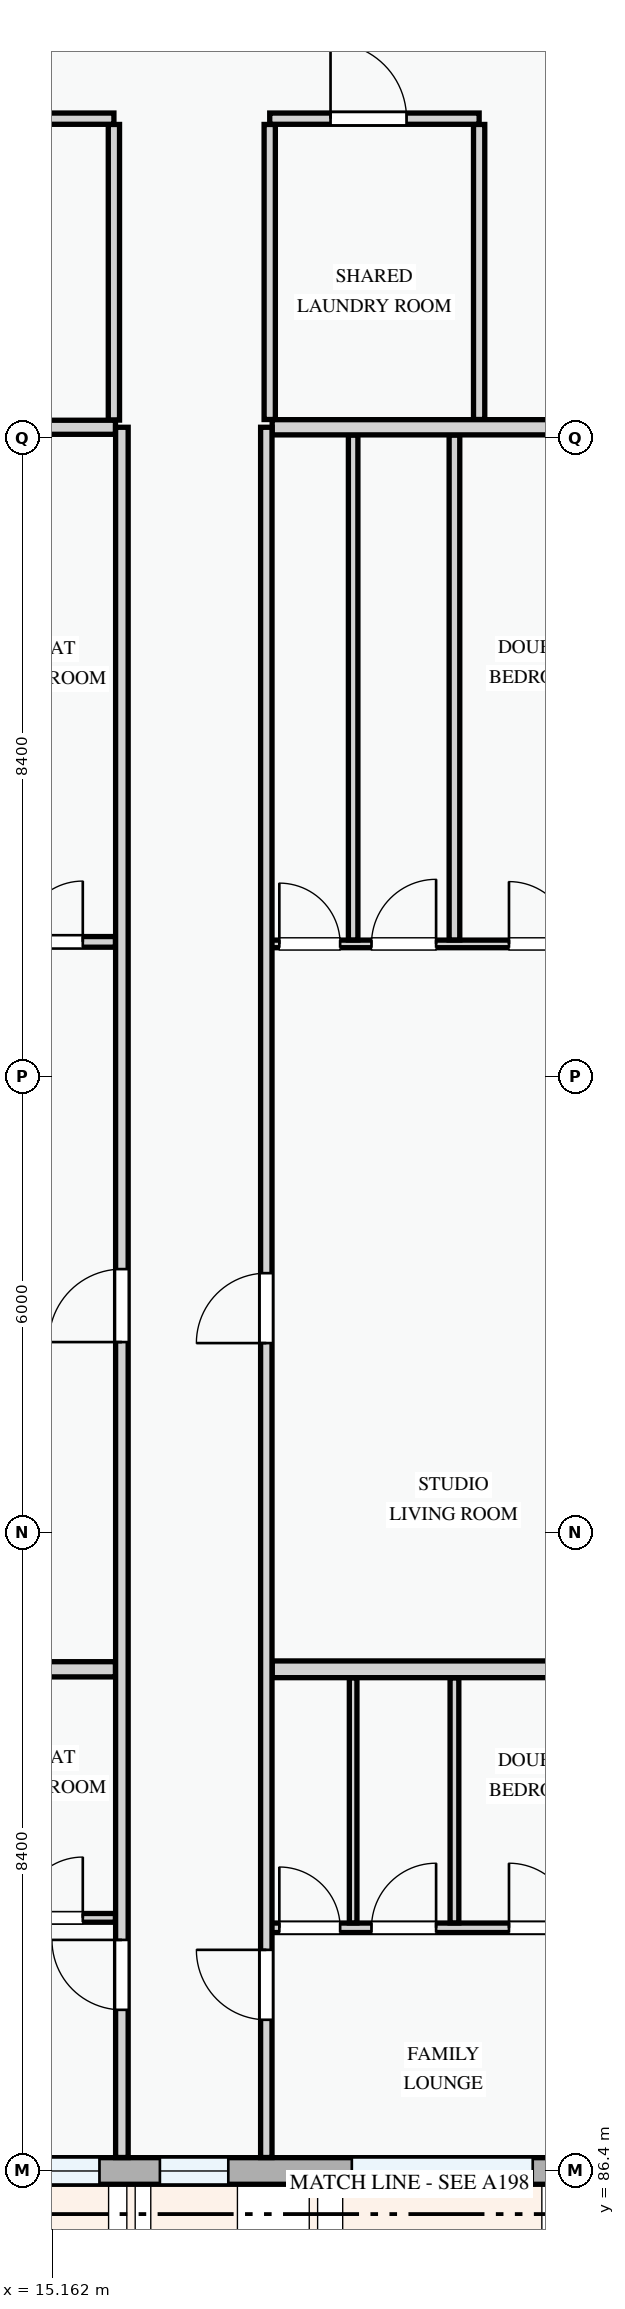
"""IFC4 building model, lengths in metres.
Left out: names, types, materials, properties, quantities, classifications, styles, units other than length and angle.
Written with IfcOpenShell. Run it as: python <this file> out.ifc"""

import sys

from ifc_helpers import new_model, si_unit, direction, frame, frame_2d, origin, place, context, subcontext, project, spatial, rectangle, extrude, element, fill, save


model = new_model("IFC4")
c1 = context("Model", 3, precision=1e-05, world=origin(), true_north=direction((0.0, 1.0)))
c2 = subcontext(c1, "Body", "Model", "MODEL_VIEW")
j1 = project(units=[si_unit("LENGTHUNIT", "METRE"), si_unit("PLANEANGLEUNIT", "RADIAN")], contexts=[c1])
p1 = place(None, origin())
s1 = spatial("IfcSite", under=j1, at=p1, CompositionType="ELEMENT")
p2 = place(p1, origin())
s2 = spatial("IfcBuilding", under=s1, at=p2, CompositionType="ELEMENT")
p3 = place(p2, frame((0.0, 0.0, 47.7)))
s3 = spatial("IfcBuildingStorey", under=s2, at=p3, CompositionType="ELEMENT", Elevation=47.7)
p4 = place(p3, frame((14.4, 86.4, 0.0), z_axis=(0.0, 0.0, 1.0), x_axis=(1.0, 0.0, 0.0)))
e1 = element("IfcWall", 1, at=p4, inside=s3, PredefinedType="STANDARD", context=c2, shape_type="SweptSolid", body=[
    extrude(rectangle(XDim=8.4, YDim=0.35, at=frame_2d((4.2, 0.0))), origin(), (0.0, 0.0, 1.0), 2.375),
])
p5 = place(p4, frame((0.485, 0.0, 0.78)))
e2 = element("IfcOpeningElement", 2, at=p5, cuts=e1, PredefinedType="OPENING", context=c2, shape_type="SweptSolid", body=[
    extrude(rectangle(XDim=0.9, YDim=1.2, at=frame_2d((0.45, 0.6))), frame((0.0, 0.185, 0.0), z_axis=(0.0, -1.0, 0.0), x_axis=(1.0, 0.0, 0.0)), (0.0, 0.0, 1.0), 0.37),
])
p6 = place(p4, frame((2.18, 0.0, 0.78)))
e3 = element("IfcOpeningElement", 3, at=p6, cuts=e1, PredefinedType="OPENING", context=c2, shape_type="SweptSolid", body=[
    extrude(rectangle(XDim=0.9, YDim=1.2, at=frame_2d((0.45, 0.6))), frame((0.0, 0.185, 0.0), z_axis=(0.0, -1.0, 0.0), x_axis=(1.0, 0.0, 0.0)), (0.0, 0.0, 1.0), 0.37),
])
p7 = place(p4, frame((4.705, 0.0, 0.78)))
e4 = element("IfcOpeningElement", 4, at=p7, cuts=e1, PredefinedType="OPENING", context=c2, shape_type="SweptSolid", body=[
    extrude(rectangle(XDim=2.38, YDim=1.48, at=frame_2d((1.19, 0.74))), frame((0.0, 0.185, 0.0), z_axis=(0.0, -1.0, 0.0), x_axis=(1.0, 0.0, 0.0)), (0.0, 0.0, 1.0), 0.37),
])
p8 = place(p3, frame((15.975, 113.324, 0.0), z_axis=(0.0, 0.0, 1.0), x_axis=(0.0, -1.0, 0.0)))
e5 = element("IfcWall", 5, at=p8, inside=s3, PredefinedType="PARTITIONING", context=c2, shape_type="SweptSolid", body=[
    extrude(rectangle(XDim=3.889, YDim=0.148, at=frame_2d((1.945, 0.0))), origin(), (0.0, 0.0, 1.0), 3.0),
])
for number, where, z_axis, x_axis in (
    (6, (18.025, 113.324, 0.0), (0.0, 0.0, 1.0), (0.0, -1.0, 0.0)),
    (7, (20.78, 113.324, 0.0), (0.0, 0.0, 1.0), (0.0, -1.0, 0.0)),
):
    element("IfcWall", number, at=place(p3, frame(where, z_axis=z_axis, x_axis=x_axis)), inside=s3, PredefinedType="PARTITIONING", context=c2, shape_type="SweptSolid", body=[
        extrude(rectangle(XDim=3.882, YDim=0.148, at=frame_2d((1.941, 0.0))), origin(), (0.0, 0.0, 1.0), 3.0),
    ])
p9 = place(p3, frame((8.577, 113.4, 0.0), z_axis=(0.0, 0.0, 1.0), x_axis=(1.0, 0.0, 0.0)))
e8 = element("IfcWall", 8, at=p9, inside=s3, PredefinedType="PARTITIONING", context=c2, shape_type="SweptSolid", body=[
    extrude(rectangle(XDim=7.398, YDim=0.148, at=frame_2d((3.699, 0.0))), origin(), (0.0, 0.0, 1.0), 3.0),
])
p10 = place(p9, frame((0.613, 0.0, 0.0)))
e9 = element("IfcOpeningElement", 9, at=p10, cuts=e8, PredefinedType="OPENING", context=c2, shape_type="SweptSolid", body=[
    extrude(rectangle(XDim=0.9, YDim=2.1, at=frame_2d((0.45, 1.05))), frame((0.0, 0.084, 0.0), z_axis=(0.0, -1.0, 0.0), x_axis=(1.0, 0.0, 0.0)), (0.0, 0.0, 1.0), 0.168),
])
p11 = place(p9, frame((4.163, 0.0, 0.0)))
e10 = element("IfcOpeningElement", 10, at=p11, cuts=e8, PredefinedType="OPENING", context=c2, shape_type="SweptSolid", body=[
    extrude(rectangle(XDim=0.95, YDim=2.1, at=frame_2d((0.475, 1.05))), frame((0.0, 0.084, 0.0), z_axis=(0.0, -1.0, 0.0), x_axis=(1.0, 0.0, 0.0)), (0.0, 0.0, 1.0), 0.168),
])
p12 = place(p3, frame((18.025, 113.4, 0.0), z_axis=(0.0, 0.0, 1.0), x_axis=(1.0, 0.0, 0.0)))
e11 = element("IfcWall", 11, at=p12, inside=s3, PredefinedType="PARTITIONING", context=c2, shape_type="SweptSolid", body=[
    extrude(rectangle(XDim=2.755, YDim=0.148, at=frame_2d((1.377, 0.0))), origin(), (0.0, 0.0, 1.0), 3.0),
])
p13 = place(p12, frame((0.8, 0.0, 0.0)))
e12 = element("IfcOpeningElement", 12, at=p13, cuts=e11, PredefinedType="OPENING", context=c2, shape_type="SweptSolid", body=[
    extrude(rectangle(XDim=1.0, YDim=2.15, at=frame_2d((0.5, 1.075))), frame((0.0, 0.084, 0.0), z_axis=(0.0, -1.0, 0.0), x_axis=(1.0, 0.0, 0.0)), (0.0, 0.0, 1.0), 0.168),
])
p14 = place(p3, frame((8.577, 89.73, 0.0), z_axis=(0.0, 0.0, 1.0), x_axis=(1.0, 0.0, 0.0)))
e13 = element("IfcWall", 13, at=p14, inside=s3, PredefinedType="PARTITIONING", context=c2, shape_type="SweptSolid", body=[
    extrude(rectangle(XDim=7.419, YDim=0.115, at=frame_2d((3.709, 0.0))), origin(), (0.0, 0.0, 1.0), 3.0),
])
p15 = place(p14, frame((1.287, 0.0, 0.0)))
e14 = element("IfcOpeningElement", 14, at=p15, cuts=e13, PredefinedType="OPENING", context=c2, shape_type="SweptSolid", body=[
    extrude(rectangle(XDim=0.85, YDim=2.1, at=frame_2d((0.425, 1.05))), frame((0.0, 0.067, 0.0), z_axis=(0.0, -1.0, 0.0), x_axis=(1.0, 0.0, 0.0)), (0.0, 0.0, 1.0), 0.135),
])
p16 = place(p14, frame((4.182, 0.0, 0.0)))
e15 = element("IfcOpeningElement", 15, at=p16, cuts=e13, PredefinedType="OPENING", context=c2, shape_type="SweptSolid", body=[
    extrude(rectangle(XDim=0.85, YDim=2.1, at=frame_2d((0.425, 1.05))), frame((0.0, 0.067, 0.0), z_axis=(0.0, -1.0, 0.0), x_axis=(1.0, 0.0, 0.0)), (0.0, 0.0, 1.0), 0.135),
])
p17 = place(p14, frame((6.189, 0.0, 0.0)))
e16 = element("IfcOpeningElement", 16, at=p17, cuts=e13, PredefinedType="OPENING", context=c2, shape_type="SweptSolid", body=[
    extrude(rectangle(XDim=0.8, YDim=2.1, at=frame_2d((0.4, 1.05))), frame((0.0, 0.067, 0.0), z_axis=(0.0, -1.0, 0.0), x_axis=(1.0, 0.0, 0.0)), (0.0, 0.0, 1.0), 0.135),
])
p18 = place(p3, frame((17.98, 89.599, 0.0), z_axis=(0.0, 0.0, 1.0), x_axis=(1.0, 0.0, 0.0)))
e17 = element("IfcWall", 17, at=p18, inside=s3, PredefinedType="PARTITIONING", context=c2, shape_type="SweptSolid", body=[
    extrude(rectangle(XDim=4.643, YDim=0.125, at=frame_2d((2.322, 0.0))), origin(), (0.0, 0.0, 1.0), 3.0),
])
p19 = place(p18, frame((0.171, 0.0, 0.0)))
e18 = element("IfcOpeningElement", 18, at=p19, cuts=e17, PredefinedType="OPENING", context=c2, shape_type="SweptSolid", body=[
    extrude(rectangle(XDim=0.8, YDim=2.1, at=frame_2d((0.4, 1.05))), frame((0.0, 0.073, 0.0), z_axis=(0.0, -1.0, 0.0), x_axis=(1.0, 0.0, 0.0)), (0.0, 0.0, 1.0), 0.145),
])
p20 = place(p18, frame((1.384, 0.0, 0.0)))
e19 = element("IfcOpeningElement", 19, at=p20, cuts=e17, PredefinedType="OPENING", context=c2, shape_type="SweptSolid", body=[
    extrude(rectangle(XDim=0.85, YDim=2.1, at=frame_2d((0.425, 1.05))), frame((0.0, 0.073, 0.0), z_axis=(0.0, -1.0, 0.0), x_axis=(1.0, 0.0, 0.0)), (0.0, 0.0, 1.0), 0.145),
])
p21 = place(p18, frame((3.193, 0.0, 0.0)))
e20 = element("IfcOpeningElement", 20, at=p21, cuts=e17, PredefinedType="OPENING", context=c2, shape_type="SweptSolid", body=[
    extrude(rectangle(XDim=0.85, YDim=2.1, at=frame_2d((0.425, 1.05))), frame((0.0, 0.073, 0.0), z_axis=(0.0, -1.0, 0.0), x_axis=(1.0, 0.0, 0.0)), (0.0, 0.0, 1.0), 0.145),
])
p22 = place(p3, frame((20.455, 89.664, 0.0), z_axis=(0.0, 0.0, 1.0), x_axis=(0.0, 1.0, 0.0)))
e21 = element("IfcWall", 21, at=p22, inside=s3, PredefinedType="PARTITIONING", context=c2, shape_type="SweptSolid", body=[
    extrude(rectangle(XDim=3.224, YDim=0.115, at=frame_2d((1.612, 0.0))), origin(), (0.0, 0.0, 1.0), 3.0),
])
p23 = place(p3, frame((19.122, 89.664, 0.0), z_axis=(0.0, 0.0, 1.0), x_axis=(0.0, 1.0, 0.0)))
e22 = element("IfcWall", 22, at=p23, inside=s3, PredefinedType="PARTITIONING", context=c2, shape_type="SweptSolid", body=[
    extrude(rectangle(XDim=3.224, YDim=0.1, at=frame_2d((1.612, 0.0))), origin(), (0.0, 0.0, 1.0), 3.0),
])
p24 = place(p3, frame((8.577, 102.57, 0.0), z_axis=(0.0, 0.0, 1.0), x_axis=(1.0, 0.0, 0.0)))
e23 = element("IfcWall", 23, at=p24, inside=s3, PredefinedType="PARTITIONING", context=c2, shape_type="SweptSolid", body=[
    extrude(rectangle(XDim=7.419, YDim=0.14, at=frame_2d((3.709, 0.0))), origin(), (0.0, 0.0, 1.0), 3.0),
])
p25 = place(p24, frame((1.287, 0.0, 0.0)))
e24 = element("IfcOpeningElement", 24, at=p25, cuts=e23, PredefinedType="OPENING", context=c2, shape_type="SweptSolid", body=[
    extrude(rectangle(XDim=0.85, YDim=2.1, at=frame_2d((0.425, 1.05))), frame((0.0, 0.08, 0.0), z_axis=(0.0, -1.0, 0.0), x_axis=(1.0, 0.0, 0.0)), (0.0, 0.0, 1.0), 0.16),
])
p26 = place(p24, frame((4.182, 0.0, 0.0)))
e25 = element("IfcOpeningElement", 25, at=p26, cuts=e23, PredefinedType="OPENING", context=c2, shape_type="SweptSolid", body=[
    extrude(rectangle(XDim=0.82, YDim=2.08, at=frame_2d((0.41, 1.04))), frame((0.0, 0.08, 0.0), z_axis=(0.0, -1.0, 0.0), x_axis=(1.0, 0.0, 0.0)), (0.0, 0.0, 1.0), 0.16),
])
p27 = place(p24, frame((6.189, 0.0, 0.0)))
e26 = element("IfcOpeningElement", 26, at=p27, cuts=e23, PredefinedType="OPENING", context=c2, shape_type="SweptSolid", body=[
    extrude(rectangle(XDim=0.8, YDim=2.1, at=frame_2d((0.4, 1.05))), frame((0.0, 0.08, 0.0), z_axis=(0.0, -1.0, 0.0), x_axis=(1.0, 0.0, 0.0)), (0.0, 0.0, 1.0), 0.16),
])
p28 = place(p3, frame((17.98, 102.543, 0.0), z_axis=(0.0, 0.0, 1.0), x_axis=(1.0, 0.0, 0.0)))
e27 = element("IfcWall", 27, at=p28, inside=s3, PredefinedType="PARTITIONING", context=c2, shape_type="SweptSolid", body=[
    extrude(rectangle(XDim=4.643, YDim=0.1, at=frame_2d((2.322, 0.0))), origin(), (0.0, 0.0, 1.0), 3.0),
])
p29 = place(p28, frame((0.171, 0.0, 0.0)))
e28 = element("IfcOpeningElement", 28, at=p29, cuts=e27, PredefinedType="OPENING", context=c2, shape_type="SweptSolid", body=[
    extrude(rectangle(XDim=0.8, YDim=2.1, at=frame_2d((0.4, 1.05))), frame((0.0, 0.06, 0.0), z_axis=(0.0, -1.0, 0.0), x_axis=(1.0, 0.0, 0.0)), (0.0, 0.0, 1.0), 0.12),
])
p30 = place(p28, frame((1.384, 0.0, 0.0)))
e29 = element("IfcOpeningElement", 29, at=p30, cuts=e27, PredefinedType="OPENING", context=c2, shape_type="SweptSolid", body=[
    extrude(rectangle(XDim=0.85, YDim=2.1, at=frame_2d((0.425, 1.05))), frame((0.0, 0.06, 0.0), z_axis=(0.0, -1.0, 0.0), x_axis=(1.0, 0.0, 0.0)), (0.0, 0.0, 1.0), 0.12),
])
p31 = place(p28, frame((3.193, 0.0, 0.0)))
e30 = element("IfcOpeningElement", 30, at=p31, cuts=e27, PredefinedType="OPENING", context=c2, shape_type="SweptSolid", body=[
    extrude(rectangle(XDim=0.82, YDim=2.08, at=frame_2d((0.41, 1.04))), frame((0.0, 0.06, 0.0), z_axis=(0.0, -1.0, 0.0), x_axis=(1.0, 0.0, 0.0)), (0.0, 0.0, 1.0), 0.12),
])
p32 = place(p3, frame((20.455, 102.595, 0.0), z_axis=(0.0, 0.0, 1.0), x_axis=(0.0, 1.0, 0.0)))
e31 = element("IfcWall", 31, at=p32, inside=s3, PredefinedType="PARTITIONING", context=c2, shape_type="SweptSolid", body=[
    extrude(rectangle(XDim=6.643, YDim=0.14, at=frame_2d((3.321, 0.0))), origin(), (0.0, 0.0, 1.0), 3.0),
])
p33 = place(p3, frame((19.122, 102.595, 0.0), z_axis=(0.0, 0.0, 1.0), x_axis=(0.0, 1.0, 0.0)))
e32 = element("IfcWall", 32, at=p33, inside=s3, PredefinedType="PARTITIONING", context=c2, shape_type="SweptSolid", body=[
    extrude(rectangle(XDim=6.643, YDim=0.125, at=frame_2d((3.321, 0.0))), origin(), (0.0, 0.0, 1.0), 3.0),
])
p34 = place(p3, frame((8.577, 93.0, 0.0), z_axis=(0.0, 0.0, 1.0), x_axis=(1.0, 0.0, 0.0)))
e33 = element("IfcWall", 33, at=p34, inside=s3, PredefinedType="PARTITIONING", context=c2, shape_type="SweptSolid", body=[
    extrude(rectangle(XDim=7.419, YDim=0.2, at=frame_2d((3.709, 0.0))), origin(), (0.0, 0.0, 1.0), 3.0),
])
p35 = place(p3, frame((18.057, 93.0, 0.0), z_axis=(0.0, 0.0, 1.0), x_axis=(1.0, 0.0, 0.0)))
e34 = element("IfcWall", 34, at=p35, inside=s3, PredefinedType="PARTITIONING", context=c2, shape_type="SweptSolid", body=[
    extrude(rectangle(XDim=4.566, YDim=0.22, at=frame_2d((2.283, 0.0))), origin(), (0.0, 0.0, 1.0), 3.0),
])
p36 = place(p3, frame((8.577, 109.34, 0.0), z_axis=(0.0, 0.0, 1.0), x_axis=(1.0, 0.0, 0.0)))
e35 = element("IfcWall", 35, at=p36, inside=s3, PredefinedType="PARTITIONING", context=c2, shape_type="SweptSolid", body=[
    extrude(rectangle(XDim=7.419, YDim=0.185, at=frame_2d((3.709, 0.0))), origin(), (0.0, 0.0, 1.0), 2.375),
])
p37 = place(p3, frame((18.057, 109.34, 0.0), z_axis=(0.0, 0.0, 1.0), x_axis=(1.0, 0.0, 0.0)))
e36 = element("IfcWall", 36, at=p37, inside=s3, PredefinedType="PARTITIONING", context=c2, shape_type="SweptSolid", body=[
    extrude(rectangle(XDim=4.683, YDim=0.2, at=frame_2d((2.342, 0.0))), origin(), (0.0, 0.0, 1.0), 2.375),
])
p38 = place(p3, frame((16.08, 86.577, 0.0), z_axis=(0.0, 0.0, 1.0), x_axis=(0.0, 1.0, 0.0)))
e37 = element("IfcWall", 37, at=p38, inside=s3, PredefinedType="PARTITIONING", context=c2, shape_type="SweptSolid", body=[
    extrude(rectangle(XDim=22.763, YDim=0.165, at=frame_2d((11.382, 0.0))), origin(), (0.0, 0.0, 1.0), 3.0),
])
p39 = place(p38, frame((1.943, 0.0, 0.0)))
e38 = element("IfcOpeningElement", 38, at=p39, cuts=e37, PredefinedType="OPENING", context=c2, shape_type="SweptSolid", body=[
    extrude(rectangle(XDim=0.92, YDim=2.1, at=frame_2d((0.46, 1.05))), frame((0.0, 0.093, 0.0), z_axis=(0.0, -1.0, 0.0), x_axis=(1.0, 0.0, 0.0)), (0.0, 0.0, 1.0), 0.185),
])
p40 = place(p38, frame((10.728, 0.0, 0.0)))
e39 = element("IfcOpeningElement", 39, at=p40, cuts=e37, PredefinedType="OPENING", context=c2, shape_type="SweptSolid", body=[
    extrude(rectangle(XDim=0.96, YDim=2.12, at=frame_2d((0.48, 1.06))), frame((0.0, 0.093, 0.0), z_axis=(0.0, -1.0, 0.0), x_axis=(1.0, 0.0, 0.0)), (0.0, 0.0, 1.0), 0.185),
])
p41 = place(p3, frame((17.98, 86.577, 0.0), z_axis=(0.0, 0.0, 1.0), x_axis=(0.0, 1.0, 0.0)))
e40 = element("IfcWall", 40, at=p41, inside=s3, PredefinedType="PARTITIONING", context=c2, shape_type="SweptSolid", body=[
    extrude(rectangle(XDim=22.763, YDim=0.15, at=frame_2d((11.382, 0.0))), origin(), (0.0, 0.0, 1.0), 3.0),
])
p42 = place(p41, frame((1.812, 0.0, 0.0)))
e41 = element("IfcOpeningElement", 41, at=p42, cuts=e40, PredefinedType="OPENING", context=c2, shape_type="SweptSolid", body=[
    extrude(rectangle(XDim=0.92, YDim=2.1, at=frame_2d((0.46, 1.05))), frame((0.0, 0.085, 0.0), z_axis=(0.0, -1.0, 0.0), x_axis=(1.0, 0.0, 0.0)), (0.0, 0.0, 1.0), 0.17),
])
p43 = place(p41, frame((10.715, 0.0, 0.0)))
e42 = element("IfcOpeningElement", 42, at=p43, cuts=e40, PredefinedType="OPENING", context=c2, shape_type="SweptSolid", body=[
    extrude(rectangle(XDim=0.92, YDim=2.1, at=frame_2d((0.46, 1.05))), frame((0.0, 0.085, 0.0), z_axis=(0.0, -1.0, 0.0), x_axis=(1.0, 0.0, 0.0)), (0.0, 0.0, 1.0), 0.17),
])
p44 = place(p5, origin())
e43 = element("IfcWindow", 43, at=p44, inside=s3, PartitioningType="SINGLE_PANEL", PredefinedType="WINDOW", context=c2, shape_type="SweptSolid", body=[
    extrude(rectangle(XDim=0.9, YDim=1.2, at=frame_2d((0.45, 0.6))), frame((0.0, 0.03, 0.0), z_axis=(0.0, -1.0, 0.0), x_axis=(1.0, 0.0, 0.0)), (0.0, 0.0, 1.0), 0.06),
])
fill(e2, e43)
p45 = place(p6, origin())
e44 = element("IfcWindow", 44, at=p45, inside=s3, PartitioningType="SINGLE_PANEL", PredefinedType="WINDOW", context=c2, shape_type="SweptSolid", body=[
    extrude(rectangle(XDim=0.9, YDim=1.2, at=frame_2d((0.45, 0.6))), frame((0.0, 0.03, 0.0), z_axis=(0.0, -1.0, 0.0), x_axis=(1.0, 0.0, 0.0)), (0.0, 0.0, 1.0), 0.06),
])
fill(e3, e44)
p46 = place(p7, origin())
e45 = element("IfcWindow", 45, at=p46, inside=s3, PartitioningType="DOUBLE_PANEL_VERTICAL", PredefinedType="WINDOW", context=c2, shape_type="SweptSolid", body=[
    extrude(rectangle(XDim=2.38, YDim=1.48, at=frame_2d((1.19, 0.74))), frame((0.0, 0.03, 0.0), z_axis=(0.0, -1.0, 0.0), x_axis=(1.0, 0.0, 0.0)), (0.0, 0.0, 1.0), 0.06),
])
fill(e4, e45)
p47 = place(p13, origin())
e46 = element("IfcDoor", 46, at=p47, inside=s3, OperationType="SINGLE_SWING_LEFT", PredefinedType="DOOR", context=c2, shape_type="SweptSolid", body=[
    extrude(rectangle(XDim=1.0, YDim=2.15, at=frame_2d((0.5, 1.075))), frame((0.0, 0.025, 0.0), z_axis=(0.0, -1.0, 0.0), x_axis=(1.0, 0.0, 0.0)), (0.0, 0.0, 1.0), 0.05),
])
fill(e12, e46)
p48 = place(p17, origin())
e47 = element("IfcDoor", 47, at=p48, inside=s3, OperationType="SINGLE_SWING_RIGHT", PredefinedType="DOOR", context=c2, shape_type="SweptSolid", body=[
    extrude(rectangle(XDim=0.8, YDim=2.1, at=frame_2d((0.4, 1.05))), frame((0.0, 0.025, 0.0), z_axis=(0.0, -1.0, 0.0), x_axis=(1.0, 0.0, 0.0)), (0.0, 0.0, 1.0), 0.05),
])
fill(e16, e47)
p49 = place(p19, origin())
e48 = element("IfcDoor", 48, at=p49, inside=s3, OperationType="SINGLE_SWING_LEFT", PredefinedType="DOOR", context=c2, shape_type="SweptSolid", body=[
    extrude(rectangle(XDim=0.8, YDim=2.1, at=frame_2d((0.4, 1.05))), frame((0.0, 0.025, 0.0), z_axis=(0.0, -1.0, 0.0), x_axis=(1.0, 0.0, 0.0)), (0.0, 0.0, 1.0), 0.05),
])
fill(e18, e48)
p50 = place(p20, origin())
e49 = element("IfcDoor", 49, at=p50, inside=s3, OperationType="SINGLE_SWING_RIGHT", PredefinedType="DOOR", context=c2, shape_type="SweptSolid", body=[
    extrude(rectangle(XDim=0.85, YDim=2.1, at=frame_2d((0.425, 1.05))), frame((0.0, 0.025, 0.0), z_axis=(0.0, -1.0, 0.0), x_axis=(1.0, 0.0, 0.0)), (0.0, 0.0, 1.0), 0.05),
])
fill(e19, e49)
p51 = place(p21, origin())
e50 = element("IfcDoor", 50, at=p51, inside=s3, OperationType="SINGLE_SWING_LEFT", PredefinedType="DOOR", context=c2, shape_type="SweptSolid", body=[
    extrude(rectangle(XDim=0.85, YDim=2.1, at=frame_2d((0.425, 1.05))), frame((0.0, 0.025, 0.0), z_axis=(0.0, -1.0, 0.0), x_axis=(1.0, 0.0, 0.0)), (0.0, 0.0, 1.0), 0.05),
])
fill(e20, e50)
p52 = place(p27, origin())
e51 = element("IfcDoor", 51, at=p52, inside=s3, OperationType="SINGLE_SWING_RIGHT", PredefinedType="DOOR", context=c2, shape_type="SweptSolid", body=[
    extrude(rectangle(XDim=0.8, YDim=2.1, at=frame_2d((0.4, 1.05))), frame((0.0, 0.025, 0.0), z_axis=(0.0, -1.0, 0.0), x_axis=(1.0, 0.0, 0.0)), (0.0, 0.0, 1.0), 0.05),
])
fill(e26, e51)
p53 = place(p29, origin())
e52 = element("IfcDoor", 52, at=p53, inside=s3, OperationType="SINGLE_SWING_LEFT", PredefinedType="DOOR", context=c2, shape_type="SweptSolid", body=[
    extrude(rectangle(XDim=0.8, YDim=2.1, at=frame_2d((0.4, 1.05))), frame((0.0, 0.025, 0.0), z_axis=(0.0, -1.0, 0.0), x_axis=(1.0, 0.0, 0.0)), (0.0, 0.0, 1.0), 0.05),
])
fill(e28, e52)
p54 = place(p30, origin())
e53 = element("IfcDoor", 53, at=p54, inside=s3, OperationType="SINGLE_SWING_RIGHT", PredefinedType="DOOR", context=c2, shape_type="SweptSolid", body=[
    extrude(rectangle(XDim=0.85, YDim=2.1, at=frame_2d((0.425, 1.05))), frame((0.0, 0.025, 0.0), z_axis=(0.0, -1.0, 0.0), x_axis=(1.0, 0.0, 0.0)), (0.0, 0.0, 1.0), 0.05),
])
fill(e29, e53)
p55 = place(p31, origin())
e54 = element("IfcDoor", 54, at=p55, inside=s3, OperationType="SINGLE_SWING_LEFT", PredefinedType="DOOR", context=c2, shape_type="SweptSolid", body=[
    extrude(rectangle(XDim=0.82, YDim=2.08, at=frame_2d((0.41, 1.04))), frame((0.0, 0.025, 0.0), z_axis=(0.0, -1.0, 0.0), x_axis=(1.0, 0.0, 0.0)), (0.0, 0.0, 1.0), 0.05),
])
fill(e30, e54)
p56 = place(p39, origin())
e55 = element("IfcDoor", 55, at=p56, inside=s3, OperationType="SINGLE_SWING_RIGHT", PredefinedType="DOOR", context=c2, shape_type="SweptSolid", body=[
    extrude(rectangle(XDim=0.92, YDim=2.1, at=frame_2d((0.46, 1.05))), frame((0.0, 0.025, 0.0), z_axis=(0.0, -1.0, 0.0), x_axis=(1.0, 0.0, 0.0)), (0.0, 0.0, 1.0), 0.05),
])
fill(e38, e55)
p57 = place(p40, origin())
e56 = element("IfcDoor", 56, at=p57, inside=s3, OperationType="SINGLE_SWING_LEFT", PredefinedType="DOOR", context=c2, shape_type="SweptSolid", body=[
    extrude(rectangle(XDim=0.96, YDim=2.12, at=frame_2d((0.48, 1.06))), frame((0.0, 0.025, 0.0), z_axis=(0.0, -1.0, 0.0), x_axis=(1.0, 0.0, 0.0)), (0.0, 0.0, 1.0), 0.05),
])
fill(e39, e56)
p58 = place(p42, origin())
e57 = element("IfcDoor", 57, at=p58, inside=s3, OperationType="SINGLE_SWING_RIGHT", PredefinedType="DOOR", context=c2, shape_type="SweptSolid", body=[
    extrude(rectangle(XDim=0.92, YDim=2.1, at=frame_2d((0.46, 1.05))), frame((0.0, 0.025, 0.0), z_axis=(0.0, -1.0, 0.0), x_axis=(1.0, 0.0, 0.0)), (0.0, 0.0, 1.0), 0.05),
])
fill(e41, e57)
p59 = place(p43, origin())
e58 = element("IfcDoor", 58, at=p59, inside=s3, OperationType="SINGLE_SWING_LEFT", PredefinedType="DOOR", context=c2, shape_type="SweptSolid", body=[
    extrude(rectangle(XDim=0.92, YDim=2.1, at=frame_2d((0.46, 1.05))), frame((0.0, 0.025, 0.0), z_axis=(0.0, -1.0, 0.0), x_axis=(1.0, 0.0, 0.0)), (0.0, 0.0, 1.0), 0.05),
])
fill(e42, e58)
save(model, sys.argv[1])
